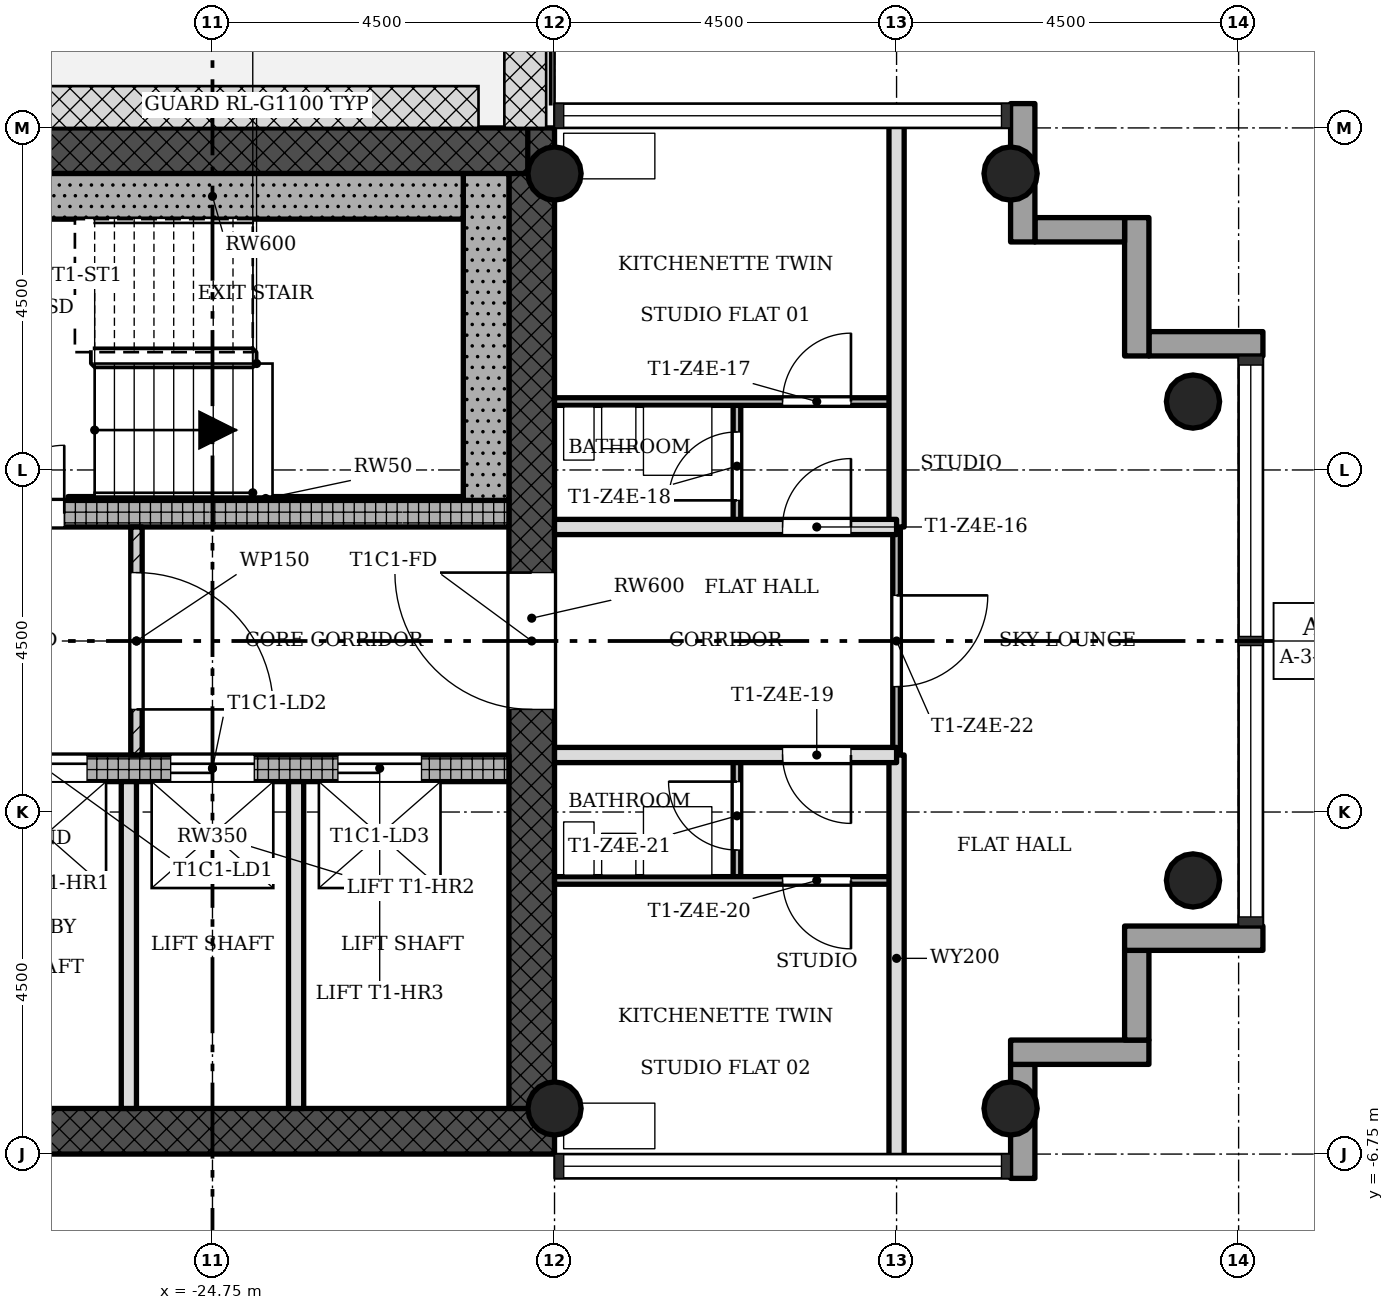
"""IFC4 building model, lengths in metres.
Left out: names, types, materials, properties, quantities, classifications, styles, units other than length and angle.
Written with IfcOpenShell. Run it as: python <this file> out.ifc"""

import sys

from ifc_helpers import new_model, si_unit, direction, frame, frame_2d, origin, origin_2d, place, context, subcontext, project, spatial, rectangle, hollow_circle, extrude, element, fill, save


model = new_model("IFC4")
c1 = context("Model", 3, precision=1e-05, world=origin(), true_north=direction((0.0, 1.0)))
c2 = subcontext(c1, "Body", "Model", "MODEL_VIEW")
j1 = project(units=[si_unit("LENGTHUNIT", "METRE"), si_unit("PLANEANGLEUNIT", "RADIAN")], contexts=[c1])
p1 = place(None, origin())
s1 = spatial("IfcSite", under=j1, at=p1, CompositionType="ELEMENT")
p2 = place(p1, origin())
s2 = spatial("IfcBuilding", under=s1, at=p2, CompositionType="ELEMENT")
p3 = place(p2, frame((0.0, 0.0, 206.2)))
s3 = spatial("IfcBuildingStorey", under=s2, at=p3, CompositionType="ELEMENT", Elevation=206.2)
p4 = place(p3, frame((-28.65, -6.45, 0.0), z_axis=(0.0, 0.0, 1.0), x_axis=(1.0, 0.0, 0.0)))
e1 = element("IfcWall", 1, at=p4, inside=s3, PredefinedType="SHEAR", context=c2, shape_type="SweptSolid", body=[
    extrude(rectangle(XDim=8.4, YDim=0.6, at=frame_2d((4.2, 0.0))), origin(), (0.0, 0.0, 1.0), 3.4),
])
p5 = place(p3, frame((-20.55, -6.15, 0.0), z_axis=(0.0, 0.0, 1.0), x_axis=(0.0, 1.0, 0.0)))
e2 = element("IfcWall", 2, at=p5, inside=s3, PredefinedType="SHEAR", context=c2, shape_type="SweptSolid", body=[
    extrude(rectangle(XDim=12.9, YDim=0.6, at=frame_2d((6.45, 0.0))), origin(), (0.0, 0.0, 1.0), 3.4),
])
p6 = place(p5, frame((5.25, 0.0, 0.0)))
e3 = element("IfcOpeningElement", 3, at=p6, cuts=e2, PredefinedType="OPENING", context=c2, shape_type="SweptSolid", body=[
    extrude(rectangle(XDim=1.8, YDim=2.1, at=frame_2d((0.9, 1.05))), frame((0.0, 0.31, 0.0), z_axis=(0.0, -1.0, 0.0), x_axis=(1.0, 0.0, 0.0)), (0.0, 0.0, 1.0), 0.62),
])
p7 = place(p3, frame((-20.602, 6.45, 0.0), z_axis=(0.0, 0.0, 1.0), x_axis=(-1.0, 0.0, 0.0)))
e4 = element("IfcWall", 4, at=p7, inside=s3, PredefinedType="SHEAR", context=c2, shape_type="SweptSolid", body=[
    extrude(rectangle(XDim=8.896, YDim=0.6, at=frame_2d((4.448, 0.0))), origin(), (0.0, 0.0, 1.0), 3.4),
])
p8 = place(p3, frame((-28.65, -1.675, 0.0), z_axis=(0.0, 0.0, 1.0), x_axis=(1.0, 0.0, 0.0)))
e5 = element("IfcWall", 5, at=p8, inside=s3, PredefinedType="SHEAR", context=c2, shape_type="SweptSolid", body=[
    extrude(rectangle(XDim=7.8, YDim=0.35, at=frame_2d((3.9, 0.0))), origin(), (0.0, 0.0, 1.0), 3.4),
])
p9 = place(p8, frame((1.15, 0.0, 0.0)))
e6 = element("IfcOpeningElement", 6, at=p9, cuts=e5, PredefinedType="OPENING", context=c2, shape_type="SweptSolid", body=[
    extrude(rectangle(XDim=1.1, YDim=2.1, at=frame_2d((0.55, 1.05))), frame((0.0, 0.185, 0.0), z_axis=(0.0, -1.0, 0.0), x_axis=(1.0, 0.0, 0.0)), (0.0, 0.0, 1.0), 0.37),
])
p10 = place(p8, frame((3.35, 0.0, 0.0)))
e7 = element("IfcOpeningElement", 7, at=p10, cuts=e5, PredefinedType="OPENING", context=c2, shape_type="SweptSolid", body=[
    extrude(rectangle(XDim=1.1, YDim=2.1, at=frame_2d((0.55, 1.05))), frame((0.0, 0.185, 0.0), z_axis=(0.0, -1.0, 0.0), x_axis=(1.0, 0.0, 0.0)), (0.0, 0.0, 1.0), 0.37),
])
p11 = place(p8, frame((5.55, 0.0, 0.0)))
e8 = element("IfcOpeningElement", 8, at=p11, cuts=e5, PredefinedType="OPENING", context=c2, shape_type="SweptSolid", body=[
    extrude(rectangle(XDim=1.1, YDim=2.1, at=frame_2d((0.55, 1.05))), frame((0.0, 0.185, 0.0), z_axis=(0.0, -1.0, 0.0), x_axis=(1.0, 0.0, 0.0)), (0.0, 0.0, 1.0), 0.37),
])
p12 = place(p3, frame((-28.65, 1.675, 0.0), z_axis=(0.0, 0.0, 1.0), x_axis=(1.0, 0.0, 0.0)))
e9 = element("IfcWall", 9, at=p12, inside=s3, PredefinedType="SHEAR", context=c2, shape_type="SweptSolid", body=[
    extrude(rectangle(XDim=7.8, YDim=0.35, at=frame_2d((3.9, 0.0))), origin(), (0.0, 0.0, 1.0), 3.4),
])
p13 = place(p12, frame((1.05, 0.0, 0.0)))
e10 = element("IfcOpeningElement", 10, at=p13, cuts=e9, PredefinedType="OPENING", context=c2, shape_type="SweptSolid", body=[
    extrude(rectangle(XDim=0.9, YDim=2.1, at=frame_2d((0.45, 1.05))), frame((0.0, 0.185, 0.0), z_axis=(0.0, -1.0, 0.0), x_axis=(1.0, 0.0, 0.0)), (0.0, 0.0, 1.0), 0.37),
])
for number, where, z_axis, x_axis in (
    (11, (-20.25, -6.15, 0.0), (0.0, 0.0, 1.0), (1.0, 0.0, 0.0)),
    (12, (-20.25, 6.15, 0.0), (0.0, 0.0, 1.0), (1.0, 0.0, 0.0)),
    (13, (-14.25, -6.15, 0.0), (0.0, 0.0, 1.0), (1.0, 0.0, 0.0)),
    (14, (-14.25, 6.15, 0.0), (0.0, 0.0, 1.0), (1.0, 0.0, 0.0)),
    (15, (-11.85, -3.15, 0.0), (0.0, 0.0, 1.0), (1.0, 0.0, 0.0)),
    (16, (-11.85, 3.15, 0.0), (0.0, 0.0, 1.0), (1.0, 0.0, 0.0)),
):
    element("IfcColumn", number, at=place(p3, frame(where, z_axis=z_axis, x_axis=x_axis)), inside=s3, PredefinedType="COLUMN", context=c2, shape_type="SweptSolid", body=[
        extrude(hollow_circle(Radius=0.35, WallThickness=0.025, at=origin_2d()), origin(), (0.0, 0.0, 1.0), 3.4),
    ])
p14 = place(p3, frame((-14.09, -7.07, -0.3), z_axis=(0.0, 0.0, 1.0), x_axis=(0.0, 1.0, 0.0)))
e17 = element("IfcWall", 17, at=p14, inside=s3, PredefinedType="STANDARD", context=c2, shape_type="SweptSolid", body=[
    extrude(rectangle(XDim=1.5, YDim=0.32, at=frame_2d((0.75, 0.0))), origin(), (0.0, 0.0, 1.0), 3.4),
])
p15 = place(p3, frame((-14.25, -5.41, -0.3), z_axis=(0.0, 0.0, 1.0), x_axis=(1.0, 0.0, 0.0)))
e18 = element("IfcWall", 18, at=p15, inside=s3, PredefinedType="STANDARD", context=c2, shape_type="SweptSolid", body=[
    extrude(rectangle(XDim=1.82, YDim=0.32, at=frame_2d((0.91, 0.0))), origin(), (0.0, 0.0, 1.0), 3.4),
])
p16 = place(p3, frame((-12.59, -5.25, -0.3), z_axis=(0.0, 0.0, 1.0), x_axis=(0.0, 1.0, 0.0)))
e19 = element("IfcWall", 19, at=p16, inside=s3, PredefinedType="STANDARD", context=c2, shape_type="SweptSolid", body=[
    extrude(rectangle(XDim=1.18, YDim=0.32, at=frame_2d((0.59, 0.0))), origin(), (0.0, 0.0, 1.0), 3.4),
])
p17 = place(p3, frame((-12.75, -3.91, -0.3), z_axis=(0.0, 0.0, 1.0), x_axis=(1.0, 0.0, 0.0)))
e20 = element("IfcWall", 20, at=p17, inside=s3, PredefinedType="STANDARD", context=c2, shape_type="SweptSolid", body=[
    extrude(rectangle(XDim=1.82, YDim=0.32, at=frame_2d((0.91, 0.0))), origin(), (0.0, 0.0, 1.0), 3.4),
])
p18 = place(p3, frame((-10.93, 3.91, -0.3), z_axis=(0.0, 0.0, 1.0), x_axis=(-1.0, 0.0, 0.0)))
e21 = element("IfcWall", 21, at=p18, inside=s3, PredefinedType="STANDARD", context=c2, shape_type="SweptSolid", body=[
    extrude(rectangle(XDim=1.5, YDim=0.32, at=frame_2d((0.75, 0.0))), origin(), (0.0, 0.0, 1.0), 3.4),
])
p19 = place(p3, frame((-12.59, 3.75, -0.3), z_axis=(0.0, 0.0, 1.0), x_axis=(0.0, 1.0, 0.0)))
e22 = element("IfcWall", 22, at=p19, inside=s3, PredefinedType="STANDARD", context=c2, shape_type="SweptSolid", body=[
    extrude(rectangle(XDim=1.82, YDim=0.32, at=frame_2d((0.91, 0.0))), origin(), (0.0, 0.0, 1.0), 3.4),
])
p20 = place(p3, frame((-12.75, 5.41, -0.3), z_axis=(0.0, 0.0, 1.0), x_axis=(-1.0, 0.0, 0.0)))
e23 = element("IfcWall", 23, at=p20, inside=s3, PredefinedType="STANDARD", context=c2, shape_type="SweptSolid", body=[
    extrude(rectangle(XDim=1.18, YDim=0.32, at=frame_2d((0.59, 0.0))), origin(), (0.0, 0.0, 1.0), 3.4),
])
p21 = place(p3, frame((-14.09, 5.25, -0.3), z_axis=(0.0, 0.0, 1.0), x_axis=(0.0, 1.0, 0.0)))
e24 = element("IfcWall", 24, at=p21, inside=s3, PredefinedType="STANDARD", context=c2, shape_type="SweptSolid", body=[
    extrude(rectangle(XDim=1.82, YDim=0.32, at=frame_2d((0.91, 0.0))), origin(), (0.0, 0.0, 1.0), 3.4),
])
p22 = place(p3, frame((-25.75, -1.5, 0.0), z_axis=(0.0, 0.0, 1.0), x_axis=(0.0, 1.0, 0.0)))
e25 = element("IfcWall", 25, at=p22, inside=s3, PredefinedType="PARTITIONING", context=c2, shape_type="SweptSolid", body=[
    extrude(rectangle(XDim=3.0, YDim=0.15, at=frame_2d((1.5, 0.0))), origin(), (0.0, 0.0, 1.0), 3.0),
])
p23 = place(p22, frame((0.6, 0.0, 0.0)))
e26 = element("IfcOpeningElement", 26, at=p23, cuts=e25, PredefinedType="OPENING", context=c2, shape_type="SweptSolid", body=[
    extrude(rectangle(XDim=1.8, YDim=2.1, at=frame_2d((0.9, 1.05))), frame((0.0, 0.085, 0.0), z_axis=(0.0, -1.0, 0.0), x_axis=(1.0, 0.0, 0.0)), (0.0, 0.0, 1.0), 0.17),
])
for number, where, z_axis, x_axis in (
    (27, (-25.85, -6.15, 0.0), (0.0, 0.0, 1.0), (0.0, 1.0, 0.0)),
    (28, (-23.65, -6.15, 0.0), (0.0, 0.0, 1.0), (0.0, 1.0, 0.0)),
):
    element("IfcWall", number, at=place(p3, frame(where, z_axis=z_axis, x_axis=x_axis)), inside=s3, PredefinedType="SOLIDWALL", context=c2, shape_type="SweptSolid", body=[
        extrude(rectangle(XDim=4.3, YDim=0.2, at=frame_2d((2.15, 0.0))), origin(), (0.0, 0.0, 1.0), 3.0),
    ])
p24 = place(p3, frame((-17.85, -3.15, 0.0), z_axis=(0.0, 0.0, 1.0), x_axis=(0.0, 1.0, 0.0)))
e29 = element("IfcWall", 29, at=p24, inside=s3, PredefinedType="PARTITIONING", context=c2, shape_type="SweptSolid", body=[
    extrude(rectangle(XDim=1.65, YDim=0.1, at=frame_2d((0.825, 0.0))), origin(), (0.0, 0.0, 1.0), 3.0),
])
p25 = place(p24, frame((0.4, 0.0, 0.0)))
e30 = element("IfcOpeningElement", 30, at=p25, cuts=e29, PredefinedType="OPENING", context=c2, shape_type="SweptSolid", body=[
    extrude(rectangle(XDim=0.9, YDim=2.1, at=frame_2d((0.45, 1.05))), frame((0.0, 0.06, 0.0), z_axis=(0.0, -1.0, 0.0), x_axis=(1.0, 0.0, 0.0)), (0.0, 0.0, 1.0), 0.12),
])
p26 = place(p3, frame((-17.85, 1.5, 0.0), z_axis=(0.0, 0.0, 1.0), x_axis=(0.0, 1.0, 0.0)))
e31 = element("IfcWall", 31, at=p26, inside=s3, PredefinedType="PARTITIONING", context=c2, shape_type="SweptSolid", body=[
    extrude(rectangle(XDim=1.65, YDim=0.1, at=frame_2d((0.825, 0.0))), origin(), (0.0, 0.0, 1.0), 3.0),
])
p27 = place(p26, frame((0.35, 0.0, 0.0)))
e32 = element("IfcOpeningElement", 32, at=p27, cuts=e31, PredefinedType="OPENING", context=c2, shape_type="SweptSolid", body=[
    extrude(rectangle(XDim=0.9, YDim=2.1, at=frame_2d((0.45, 1.05))), frame((0.0, 0.06, 0.0), z_axis=(0.0, -1.0, 0.0), x_axis=(1.0, 0.0, 0.0)), (0.0, 0.0, 1.0), 0.12),
])
p28 = place(p3, frame((-15.75, -1.5, 0.0), z_axis=(0.0, 0.0, 1.0), x_axis=(0.0, 1.0, 0.0)))
e33 = element("IfcWall", 33, at=p28, inside=s3, PredefinedType="PARTITIONING", context=c2, shape_type="SweptSolid", body=[
    extrude(rectangle(XDim=3.0, YDim=0.1, at=frame_2d((1.5, 0.0))), origin(), (0.0, 0.0, 1.0), 3.0),
])
p29 = place(p28, frame((0.9, 0.0, 0.0)))
e34 = element("IfcOpeningElement", 34, at=p29, cuts=e33, PredefinedType="OPENING", context=c2, shape_type="SweptSolid", body=[
    extrude(rectangle(XDim=1.2, YDim=2.1, at=frame_2d((0.6, 1.05))), frame((0.0, 0.06, 0.0), z_axis=(0.0, -1.0, 0.0), x_axis=(1.0, 0.0, 0.0)), (0.0, 0.0, 1.0), 0.12),
])
for number, where, z_axis, x_axis in (
    (35, (-15.75, -6.85, 0.0), (0.0, 0.0, 1.0), (0.0, 1.0, 0.0)),
    (36, (-15.75, 1.5, 0.0), (0.0, 0.0, 1.0), (0.0, 1.0, 0.0)),
):
    element("IfcWall", number, at=place(p3, frame(where, z_axis=z_axis, x_axis=x_axis)), inside=s3, PredefinedType="SOLIDWALL", context=c2, shape_type="SweptSolid", body=[
        extrude(rectangle(XDim=5.35, YDim=0.2, at=frame_2d((2.675, 0.0))), origin(), (0.0, 0.0, 1.0), 3.0),
    ])
p30 = place(p3, frame((-20.25, -3.15, 0.0), z_axis=(0.0, 0.0, 1.0), x_axis=(1.0, 0.0, 0.0)))
e37 = element("IfcWall", 37, at=p30, inside=s3, PredefinedType="PARTITIONING", context=c2, shape_type="SweptSolid", body=[
    extrude(rectangle(XDim=4.5, YDim=0.1, at=frame_2d((2.25, 0.0))), origin(), (0.0, 0.0, 1.0), 3.0),
])
p31 = place(p30, frame((3.0, 0.0, 0.0)))
e38 = element("IfcOpeningElement", 38, at=p31, cuts=e37, PredefinedType="OPENING", context=c2, shape_type="SweptSolid", body=[
    extrude(rectangle(XDim=0.9, YDim=2.1, at=frame_2d((0.45, 1.05))), frame((0.0, 0.06, 0.0), z_axis=(0.0, -1.0, 0.0), x_axis=(1.0, 0.0, 0.0)), (0.0, 0.0, 1.0), 0.12),
])
p32 = place(p3, frame((-20.25, -1.5, 0.0), z_axis=(0.0, 0.0, 1.0), x_axis=(1.0, 0.0, 0.0)))
e39 = element("IfcWall", 39, at=p32, inside=s3, PredefinedType="SOLIDWALL", context=c2, shape_type="SweptSolid", body=[
    extrude(rectangle(XDim=4.5, YDim=0.2, at=frame_2d((2.25, 0.0))), origin(), (0.0, 0.0, 1.0), 3.0),
])
p33 = place(p32, frame((3.0, 0.0, 0.0)))
e40 = element("IfcOpeningElement", 40, at=p33, cuts=e39, PredefinedType="OPENING", context=c2, shape_type="SweptSolid", body=[
    extrude(rectangle(XDim=0.9, YDim=2.1, at=frame_2d((0.45, 1.05))), frame((0.0, 0.11, 0.0), z_axis=(0.0, -1.0, 0.0), x_axis=(1.0, 0.0, 0.0)), (0.0, 0.0, 1.0), 0.22),
])
p34 = place(p3, frame((-20.25, 1.5, 0.0), z_axis=(0.0, 0.0, 1.0), x_axis=(1.0, 0.0, 0.0)))
e41 = element("IfcWall", 41, at=p34, inside=s3, PredefinedType="SOLIDWALL", context=c2, shape_type="SweptSolid", body=[
    extrude(rectangle(XDim=4.5, YDim=0.2, at=frame_2d((2.25, 0.0))), origin(), (0.0, 0.0, 1.0), 3.0),
])
p35 = place(p34, frame((3.0, 0.0, 0.0)))
e42 = element("IfcOpeningElement", 42, at=p35, cuts=e41, PredefinedType="OPENING", context=c2, shape_type="SweptSolid", body=[
    extrude(rectangle(XDim=0.9, YDim=2.1, at=frame_2d((0.45, 1.05))), frame((0.0, 0.11, 0.0), z_axis=(0.0, -1.0, 0.0), x_axis=(1.0, 0.0, 0.0)), (0.0, 0.0, 1.0), 0.22),
])
p36 = place(p3, frame((-20.25, 3.15, 0.0), z_axis=(0.0, 0.0, 1.0), x_axis=(1.0, 0.0, 0.0)))
e43 = element("IfcWall", 43, at=p36, inside=s3, PredefinedType="PARTITIONING", context=c2, shape_type="SweptSolid", body=[
    extrude(rectangle(XDim=4.5, YDim=0.1, at=frame_2d((2.25, 0.0))), origin(), (0.0, 0.0, 1.0), 3.0),
])
p37 = place(p36, frame((3.0, 0.0, 0.0)))
e44 = element("IfcOpeningElement", 44, at=p37, cuts=e43, PredefinedType="OPENING", context=c2, shape_type="SweptSolid", body=[
    extrude(rectangle(XDim=0.9, YDim=2.1, at=frame_2d((0.45, 1.05))), frame((0.0, 0.06, 0.0), z_axis=(0.0, -1.0, 0.0), x_axis=(1.0, 0.0, 0.0)), (0.0, 0.0, 1.0), 0.12),
])
p38 = place(p3, frame((-21.15, 1.85, 0.0), z_axis=(0.0, 0.0, 1.0), x_axis=(0.0, 1.0, 0.0)))
e45 = element("IfcWall", 45, at=p38, inside=s3, PredefinedType="SHEAR", context=c2, shape_type="SweptSolid", body=[
    extrude(rectangle(XDim=4.3, YDim=0.6, at=frame_2d((2.15, 0.0))), origin(), (0.0, 0.0, 1.0), 3.4),
])
p39 = place(p3, frame((-28.05, 5.85, 0.0), z_axis=(0.0, 0.0, 1.0), x_axis=(1.0, 0.0, 0.0)))
e46 = element("IfcWall", 46, at=p39, inside=s3, PredefinedType="SHEAR", context=c2, shape_type="SweptSolid", body=[
    extrude(rectangle(XDim=6.6, YDim=0.6, at=frame_2d((3.3, 0.0))), origin(), (0.0, 0.0, 1.0), 3.4),
])
p40 = place(p3, frame((-26.65, 1.875, 0.0), z_axis=(0.0, 0.0, 1.0), x_axis=(1.0, 0.0, 0.0)))
e47 = element("IfcWall", 47, at=p40, inside=s3, PredefinedType="SHEAR", context=c2, shape_type="SweptSolid", body=[
    extrude(rectangle(XDim=5.2, YDim=0.05, at=frame_2d((2.6, 0.0))), origin(), (0.0, 0.0, 1.0), 3.4),
])
p41 = place(p23, origin())
e48 = element("IfcDoor", 48, at=p41, inside=s3, OperationType="SINGLE_SWING_LEFT", PredefinedType="DOOR", context=c2, shape_type="SweptSolid", body=[
    extrude(rectangle(XDim=1.8, YDim=2.1, at=frame_2d((0.9, 1.05))), frame((0.0, 0.025, 0.0), z_axis=(0.0, -1.0, 0.0), x_axis=(1.0, 0.0, 0.0)), (0.0, 0.0, 1.0), 0.05),
])
fill(e26, e48)
p42 = place(p35, origin())
e49 = element("IfcDoor", 49, at=p42, inside=s3, OperationType="SINGLE_SWING_LEFT", PredefinedType="DOOR", context=c2, shape_type="SweptSolid", body=[
    extrude(rectangle(XDim=0.9, YDim=2.1, at=frame_2d((0.45, 1.05))), frame((0.0, 0.025, 0.0), z_axis=(0.0, -1.0, 0.0), x_axis=(1.0, 0.0, 0.0)), (0.0, 0.0, 1.0), 0.05),
])
fill(e42, e49)
p43 = place(p37, origin())
e50 = element("IfcDoor", 50, at=p43, inside=s3, OperationType="SINGLE_SWING_LEFT", PredefinedType="DOOR", context=c2, shape_type="SweptSolid", body=[
    extrude(rectangle(XDim=0.9, YDim=2.1, at=frame_2d((0.45, 1.05))), frame((0.0, 0.025, 0.0), z_axis=(0.0, -1.0, 0.0), x_axis=(1.0, 0.0, 0.0)), (0.0, 0.0, 1.0), 0.05),
])
fill(e44, e50)
p44 = place(p27, origin())
e51 = element("IfcDoor", 51, at=p44, inside=s3, OperationType="SINGLE_SWING_RIGHT", PredefinedType="DOOR", context=c2, shape_type="SweptSolid", body=[
    extrude(rectangle(XDim=0.9, YDim=2.1, at=frame_2d((0.45, 1.05))), frame((0.0, 0.025, 0.0), z_axis=(0.0, -1.0, 0.0), x_axis=(1.0, 0.0, 0.0)), (0.0, 0.0, 1.0), 0.05),
])
fill(e32, e51)
p45 = place(p33, origin())
e52 = element("IfcDoor", 52, at=p45, inside=s3, OperationType="SINGLE_SWING_RIGHT", PredefinedType="DOOR", context=c2, shape_type="SweptSolid", body=[
    extrude(rectangle(XDim=0.9, YDim=2.1, at=frame_2d((0.45, 1.05))), frame((0.0, 0.025, 0.0), z_axis=(0.0, -1.0, 0.0), x_axis=(1.0, 0.0, 0.0)), (0.0, 0.0, 1.0), 0.05),
])
fill(e40, e52)
p46 = place(p31, origin())
e53 = element("IfcDoor", 53, at=p46, inside=s3, OperationType="SINGLE_SWING_RIGHT", PredefinedType="DOOR", context=c2, shape_type="SweptSolid", body=[
    extrude(rectangle(XDim=0.9, YDim=2.1, at=frame_2d((0.45, 1.05))), frame((0.0, 0.025, 0.0), z_axis=(0.0, -1.0, 0.0), x_axis=(1.0, 0.0, 0.0)), (0.0, 0.0, 1.0), 0.05),
])
fill(e38, e53)
p47 = place(p25, origin())
e54 = element("IfcDoor", 54, at=p47, inside=s3, OperationType="SINGLE_SWING_LEFT", PredefinedType="DOOR", context=c2, shape_type="SweptSolid", body=[
    extrude(rectangle(XDim=0.9, YDim=2.1, at=frame_2d((0.45, 1.05))), frame((0.0, 0.025, 0.0), z_axis=(0.0, -1.0, 0.0), x_axis=(1.0, 0.0, 0.0)), (0.0, 0.0, 1.0), 0.05),
])
fill(e30, e54)
p48 = place(p29, origin())
e55 = element("IfcDoor", 55, at=p48, inside=s3, OperationType="SINGLE_SWING_RIGHT", PredefinedType="DOOR", context=c2, shape_type="SweptSolid", body=[
    extrude(rectangle(XDim=1.2, YDim=2.1, at=frame_2d((0.6, 1.05))), frame((0.0, 0.025, 0.0), z_axis=(0.0, -1.0, 0.0), x_axis=(1.0, 0.0, 0.0)), (0.0, 0.0, 1.0), 0.05),
])
fill(e34, e55)
p49 = place(p13, origin())
e56 = element("IfcDoor", 56, at=p49, inside=s3, OperationType="SINGLE_SWING_LEFT", PredefinedType="DOOR", context=c2, shape_type="SweptSolid", body=[
    extrude(rectangle(XDim=0.9, YDim=2.1, at=frame_2d((0.45, 1.05))), frame((0.0, 0.025, 0.0), z_axis=(0.0, -1.0, 0.0), x_axis=(1.0, 0.0, 0.0)), (0.0, 0.0, 1.0), 0.05),
])
fill(e10, e56)
p50 = place(p9, origin())
e57 = element("IfcDoor", 57, at=p50, inside=s3, OperationType="SLIDING_TO_LEFT", PredefinedType="DOOR", context=c2, shape_type="SweptSolid", body=[
    extrude(rectangle(XDim=1.1, YDim=2.1, at=frame_2d((0.55, 1.05))), frame((0.0, 0.025, 0.0), z_axis=(0.0, -1.0, 0.0), x_axis=(1.0, 0.0, 0.0)), (0.0, 0.0, 1.0), 0.05),
])
fill(e6, e57)
p51 = place(p10, origin())
e58 = element("IfcDoor", 58, at=p51, inside=s3, OperationType="SLIDING_TO_LEFT", PredefinedType="DOOR", context=c2, shape_type="SweptSolid", body=[
    extrude(rectangle(XDim=1.1, YDim=2.1, at=frame_2d((0.55, 1.05))), frame((0.0, 0.025, 0.0), z_axis=(0.0, -1.0, 0.0), x_axis=(1.0, 0.0, 0.0)), (0.0, 0.0, 1.0), 0.05),
])
fill(e7, e58)
p52 = place(p11, origin())
e59 = element("IfcDoor", 59, at=p52, inside=s3, OperationType="SLIDING_TO_LEFT", PredefinedType="DOOR", context=c2, shape_type="SweptSolid", body=[
    extrude(rectangle(XDim=1.1, YDim=2.1, at=frame_2d((0.55, 1.05))), frame((0.0, 0.025, 0.0), z_axis=(0.0, -1.0, 0.0), x_axis=(1.0, 0.0, 0.0)), (0.0, 0.0, 1.0), 0.05),
])
fill(e8, e59)
p53 = place(p6, origin())
e60 = element("IfcDoor", 60, at=p53, inside=s3, OperationType="SINGLE_SWING_LEFT", PredefinedType="DOOR", context=c2, shape_type="SweptSolid", body=[
    extrude(rectangle(XDim=1.8, YDim=2.1, at=frame_2d((0.9, 1.05))), frame((0.0, 0.025, 0.0), z_axis=(0.0, -1.0, 0.0), x_axis=(1.0, 0.0, 0.0)), (0.0, 0.0, 1.0), 0.05),
])
fill(e3, e60)
save(model, sys.argv[1])
